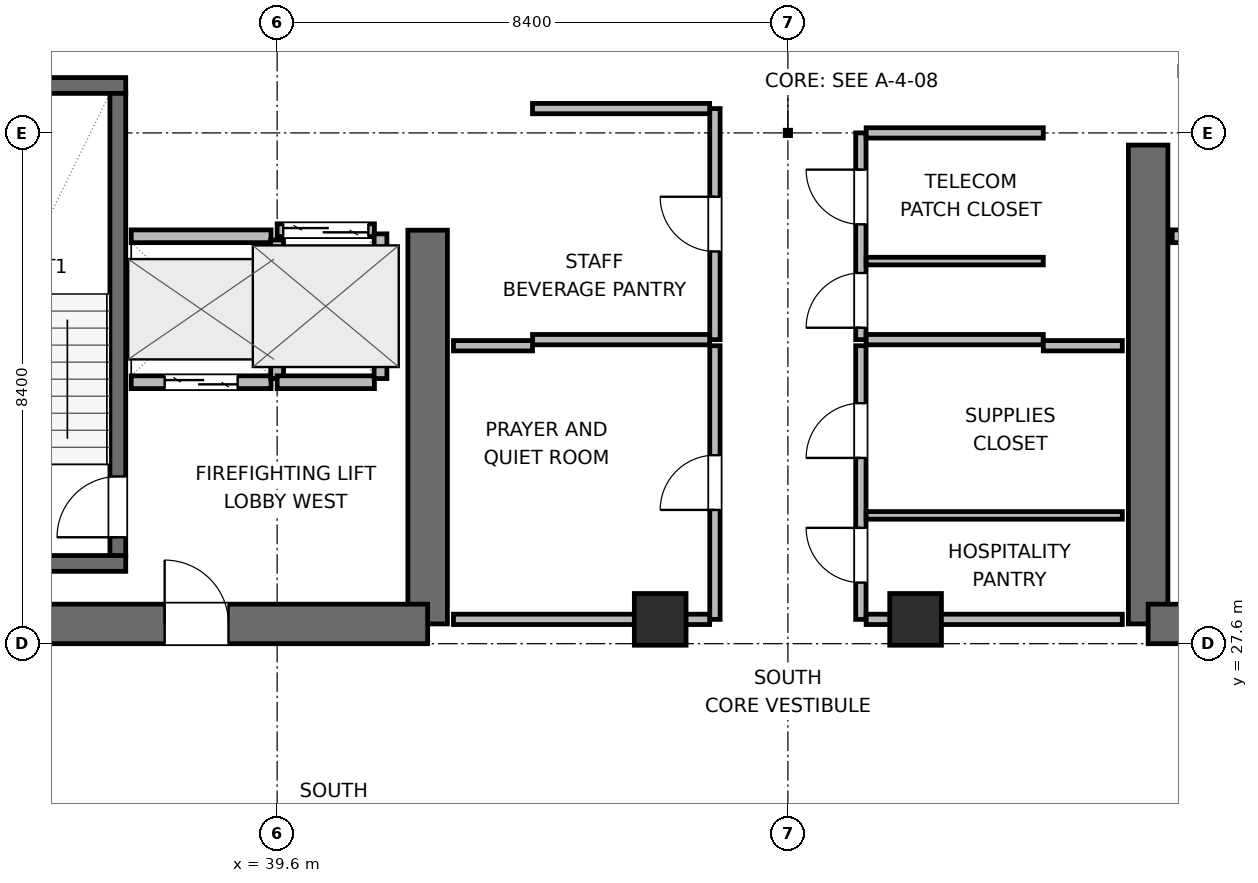
"""IFC4 building model, lengths in metres.
Left out: names, types, materials, properties, quantities, classifications, styles, units other than length and angle.
Written with IfcOpenShell. Run it as: python <this file> out.ifc"""

import sys

from ifc_helpers import new_model, si_unit, direction, frame, frame_2d, origin, origin_2d, place, context, subcontext, project, spatial, rectangle, extrude, element, fill, save


model = new_model("IFC4")
c1 = context("Model", 3, precision=1e-05, world=origin(), true_north=direction((0.0, 1.0)))
c2 = subcontext(c1, "Body", "Model", "MODEL_VIEW")
j1 = project(units=[si_unit("LENGTHUNIT", "METRE"), si_unit("PLANEANGLEUNIT", "RADIAN")], contexts=[c1])
p1 = place(None, origin())
s1 = spatial("IfcSite", under=j1, at=p1, CompositionType="ELEMENT")
p2 = place(p1, origin())
s2 = spatial("IfcBuilding", under=s1, at=p2, CompositionType="ELEMENT")
p3 = place(p2, frame((0.0, 0.0, 205.8)))
s3 = spatial("IfcBuildingStorey", under=s2, at=p3, CompositionType="ELEMENT", Elevation=205.8)
p4 = place(p3, frame((42.075, 27.925, 0.0), z_axis=(0.0, 0.0, 1.0), x_axis=(0.0, 1.0, 0.0)))
e1 = element("IfcWall", 1, at=p4, inside=s3, PredefinedType="SHEAR", context=c2, shape_type="SweptSolid", body=[
    extrude(rectangle(XDim=6.475, YDim=0.65, at=frame_2d((3.237, 0.0))), origin(), (0.0, 0.0, 1.0), 3.9),
])
p5 = place(p3, frame((32.725, 27.925, 0.0), z_axis=(0.0, 0.0, 1.0), x_axis=(1.0, 0.0, 0.0)))
e2 = element("IfcWall", 2, at=p5, inside=s3, PredefinedType="SHEAR", context=c2, shape_type="SweptSolid", body=[
    extrude(rectangle(XDim=9.35, YDim=0.65, at=frame_2d((4.675, 0.0))), origin(), (0.0, 0.0, 1.0), 3.9),
])
p6 = place(p5, frame((5.025, 0.0, 0.0)))
e3 = element("IfcOpeningElement", 3, at=p6, cuts=e2, PredefinedType="OPENING", context=c2, shape_type="SweptSolid", body=[
    extrude(rectangle(XDim=1.05, YDim=2.04, at=frame_2d((0.525, 1.02))), frame((0.0, 0.335, 0.0), z_axis=(0.0, -1.0, 0.0), x_axis=(1.0, 0.0, 0.0)), (0.0, 0.0, 1.0), 0.67),
])
p7 = place(p3, frame((53.925, 27.925, 0.0), z_axis=(0.0, 0.0, 1.0), x_axis=(0.0, 1.0, 0.0)))
e4 = element("IfcWall", 4, at=p7, inside=s3, PredefinedType="SHEAR", context=c2, shape_type="SweptSolid", body=[
    extrude(rectangle(XDim=7.875, YDim=0.65, at=frame_2d((3.938, 0.0))), origin(), (0.0, 0.0, 1.0), 3.9),
])
p8 = place(p3, frame((53.925, 27.925, 0.0), z_axis=(0.0, 0.0, 1.0), x_axis=(1.0, 0.0, 0.0)))
e5 = element("IfcWall", 5, at=p8, inside=s3, PredefinedType="SHEAR", context=c2, shape_type="SweptSolid", body=[
    extrude(rectangle(XDim=9.35, YDim=0.65, at=frame_2d((4.675, 0.0))), origin(), (0.0, 0.0, 1.0), 3.9),
])
p9 = place(p8, frame((3.975, 0.0, 0.0)))
e6 = element("IfcOpeningElement", 6, at=p9, cuts=e5, PredefinedType="OPENING", context=c2, shape_type="SweptSolid", body=[
    extrude(rectangle(XDim=1.05, YDim=2.04, at=frame_2d((0.525, 1.02))), frame((0.0, 0.335, 0.0), z_axis=(0.0, -1.0, 0.0), x_axis=(1.0, 0.0, 0.0)), (0.0, 0.0, 1.0), 0.67),
])
for number, where, z_axis, x_axis in (
    (7, (33.05, 28.92, 0.0), (0.0, 0.0, 1.0), (1.0, 0.0, 0.0)),
    (8, (33.05, 36.78, 0.0), (0.0, 0.0, 1.0), (1.0, 0.0, 0.0)),
):
    element("IfcWall", number, at=place(p3, frame(where, z_axis=z_axis, x_axis=x_axis)), inside=s3, PredefinedType="SHEAR", context=c2, shape_type="SweptSolid", body=[
        extrude(rectangle(XDim=4.06, YDim=0.26, at=frame_2d((2.03, 0.0))), origin(), (0.0, 0.0, 1.0), 3.9),
    ])
p10 = place(p3, frame((36.98, 29.05, 0.0), z_axis=(0.0, 0.0, 1.0), x_axis=(0.0, 1.0, 0.0)))
e9 = element("IfcWall", 9, at=p10, inside=s3, PredefinedType="SHEAR", context=c2, shape_type="SweptSolid", body=[
    extrude(rectangle(XDim=7.6, YDim=0.26, at=frame_2d((3.8, 0.0))), origin(), (0.0, 0.0, 1.0), 3.9),
])
p11 = place(p10, frame((0.3, 0.0, 0.0)))
e10 = element("IfcOpeningElement", 10, at=p11, cuts=e9, PredefinedType="OPENING", context=c2, shape_type="SweptSolid", body=[
    extrude(rectangle(XDim=1.0, YDim=2.04, at=frame_2d((0.5, 1.02))), frame((0.0, 0.14, 0.0), z_axis=(0.0, -1.0, 0.0), x_axis=(1.0, 0.0, 0.0)), (0.0, 0.0, 1.0), 0.28),
])
for number, where, z_axis, x_axis in (
    (11, (45.9, 28.0, 0.0), (0.0, 0.0, 1.0), (1.0, 0.0, 0.0)),
    (12, (50.1, 28.0, 0.0), (0.0, 0.0, 1.0), (1.0, 0.0, 0.0)),
):
    element("IfcColumn", number, at=place(p3, frame(where, z_axis=z_axis, x_axis=x_axis)), inside=s3, PredefinedType="COLUMN", context=c2, shape_type="SweptSolid", body=[
        extrude(rectangle(XDim=0.85, YDim=0.85, at=origin_2d()), origin(), (0.0, 0.0, 1.0), 3.9),
    ])
p12 = place(p3, frame((37.2, 31.9, 0.0), z_axis=(0.0, 0.0, 1.0), x_axis=(1.0, 0.0, 0.0)))
e13 = element("IfcWall", 13, at=p12, inside=s3, PredefinedType="PARTITIONING", context=c2, shape_type="SweptSolid", body=[
    extrude(rectangle(XDim=2.3, YDim=0.21, at=frame_2d((1.15, 0.0))), origin(), (0.0, 0.0, 1.0), 3.6),
])
p13 = place(p12, frame((0.55, 0.0, 0.0)))
e14 = element("IfcOpeningElement", 14, at=p13, cuts=e13, PredefinedType="OPENING", context=c2, shape_type="SweptSolid", body=[
    extrude(rectangle(XDim=1.2, YDim=2.04, at=frame_2d((0.6, 1.02))), frame((0.0, 0.115, 0.0), z_axis=(0.0, -1.0, 0.0), x_axis=(1.0, 0.0, 0.0)), (0.0, 0.0, 1.0), 0.23),
])
p14 = place(p3, frame((37.2, 34.3, 0.0), z_axis=(0.0, 0.0, 1.0), x_axis=(1.0, 0.0, 0.0)))
e15 = element("IfcWall", 15, at=p14, inside=s3, PredefinedType="PARTITIONING", context=c2, shape_type="SweptSolid", body=[
    extrude(rectangle(XDim=2.3, YDim=0.21, at=frame_2d((1.15, 0.0))), origin(), (0.0, 0.0, 1.0), 3.6),
])
p15 = place(p3, frame((39.6, 31.96, 0.0), z_axis=(0.0, 0.0, 1.0), x_axis=(0.0, 1.0, 0.0)))
e16 = element("IfcWall", 16, at=p15, inside=s3, PredefinedType="PARTITIONING", context=c2, shape_type="SweptSolid", body=[
    extrude(rectangle(XDim=2.28, YDim=0.21, at=frame_2d((1.14, 0.0))), origin(), (0.0, 0.0, 1.0), 3.6),
])
p16 = place(p3, frame((54.32, 34.3, 0.0), z_axis=(0.0, 0.0, 1.0), x_axis=(1.0, 0.0, 0.0)))
e17 = element("IfcWall", 17, at=p16, inside=s3, PredefinedType="PARTITIONING", context=c2, shape_type="SweptSolid", body=[
    extrude(rectangle(XDim=3.48, YDim=0.21, at=frame_2d((1.74, 0.0))), origin(), (0.0, 0.0, 1.0), 3.6),
])
p17 = place(p3, frame((39.6, 34.4, 0.0), z_axis=(0.0, 0.0, 1.0), x_axis=(1.0, 0.0, 0.0)))
e18 = element("IfcWall", 18, at=p17, inside=s3, PredefinedType="PARTITIONING", context=c2, shape_type="SweptSolid", body=[
    extrude(rectangle(XDim=1.6, YDim=0.21, at=frame_2d((0.8, 0.0))), origin(), (0.0, 0.0, 1.0), 3.6),
])
p18 = place(p17, frame((0.1, 0.0, 0.0)))
e19 = element("IfcOpeningElement", 19, at=p18, cuts=e18, PredefinedType="OPENING", context=c2, shape_type="SweptSolid", body=[
    extrude(rectangle(XDim=1.4, YDim=2.06, at=frame_2d((0.7, 1.03))), frame((0.0, 0.115, 0.0), z_axis=(0.0, -1.0, 0.0), x_axis=(1.0, 0.0, 0.0)), (0.0, 0.0, 1.0), 0.23),
])
p19 = place(p3, frame((39.6, 31.9, 0.0), z_axis=(0.0, 0.0, 1.0), x_axis=(1.0, 0.0, 0.0)))
e20 = element("IfcWall", 20, at=p19, inside=s3, PredefinedType="PARTITIONING", context=c2, shape_type="SweptSolid", body=[
    extrude(rectangle(XDim=1.6, YDim=0.21, at=frame_2d((0.8, 0.0))), origin(), (0.0, 0.0, 1.0), 3.6),
])
p20 = place(p3, frame((41.3, 31.96, 0.0), z_axis=(0.0, 0.0, 1.0), x_axis=(0.0, 1.0, 0.0)))
e21 = element("IfcWall", 21, at=p20, inside=s3, PredefinedType="PARTITIONING", context=c2, shape_type="SweptSolid", body=[
    extrude(rectangle(XDim=2.38, YDim=0.21, at=frame_2d((1.19, 0.0))), origin(), (0.0, 0.0, 1.0), 3.6),
])
p21 = place(p3, frame((46.8, 32.6, 0.0), z_axis=(0.0, 0.0, 1.0), x_axis=(0.0, 1.0, 0.0)))
e22 = element("IfcWall", 22, at=p21, inside=s3, PredefinedType="PARTITIONING", context=c2, shape_type="SweptSolid", body=[
    extrude(rectangle(XDim=3.8, YDim=0.17, at=frame_2d((1.9, 0.0))), origin(), (0.0, 0.0, 1.0), 3.6),
])
p22 = place(p21, frame((1.45, 0.0, 0.0)))
e23 = element("IfcOpeningElement", 23, at=p22, cuts=e22, PredefinedType="OPENING", context=c2, shape_type="SweptSolid", body=[
    extrude(rectangle(XDim=0.9, YDim=2.02, at=frame_2d((0.45, 1.01))), frame((0.0, 0.095, 0.0), z_axis=(0.0, -1.0, 0.0), x_axis=(1.0, 0.0, 0.0)), (0.0, 0.0, 1.0), 0.19),
])
for number, where, z_axis, x_axis in (
    (24, (43.8, 32.6, 0.0), (0.0, 0.0, 1.0), (1.0, 0.0, 0.0)),
    (25, (43.8, 36.4, 0.0), (0.0, 0.0, 1.0), (1.0, 0.0, 0.0)),
):
    element("IfcWall", number, at=place(p3, frame(where, z_axis=z_axis, x_axis=x_axis)), inside=s3, PredefinedType="PARTITIONING", context=c2, shape_type="SweptSolid", body=[
        extrude(rectangle(XDim=2.913, YDim=0.17, at=frame_2d((1.457, 0.0))), origin(), (0.0, 0.0, 1.0), 3.6),
    ])
p23 = place(p3, frame((49.2, 32.6, 0.0), z_axis=(0.0, 0.0, 1.0), x_axis=(0.0, 1.0, 0.0)))
e26 = element("IfcWall", 26, at=p23, inside=s3, PredefinedType="PARTITIONING", context=c2, shape_type="SweptSolid", body=[
    extrude(rectangle(XDim=3.4, YDim=0.17, at=frame_2d((1.7, 0.0))), origin(), (0.0, 0.0, 1.0), 3.6),
])
p24 = place(p23, frame((0.196, 0.0, 0.0)))
e27 = element("IfcOpeningElement", 27, at=p24, cuts=e26, PredefinedType="OPENING", context=c2, shape_type="SweptSolid", body=[
    extrude(rectangle(XDim=0.9, YDim=2.02, at=frame_2d((0.45, 1.01))), frame((0.0, 0.095, 0.0), z_axis=(0.0, -1.0, 0.0), x_axis=(1.0, 0.0, 0.0)), (0.0, 0.0, 1.0), 0.19),
])
p25 = place(p23, frame((1.896, 0.0, 0.0)))
e28 = element("IfcOpeningElement", 28, at=p25, cuts=e26, PredefinedType="OPENING", context=c2, shape_type="SweptSolid", body=[
    extrude(rectangle(XDim=0.9, YDim=2.02, at=frame_2d((0.45, 1.01))), frame((0.0, 0.095, 0.0), z_axis=(0.0, -1.0, 0.0), x_axis=(1.0, 0.0, 0.0)), (0.0, 0.0, 1.0), 0.19),
])
for number, where, z_axis, x_axis in (
    (29, (49.287, 32.6, 0.0), (0.0, 0.0, 1.0), (1.0, 0.0, 0.0)),
    (30, (49.287, 36.0, 0.0), (0.0, 0.0, 1.0), (1.0, 0.0, 0.0)),
):
    element("IfcWall", number, at=place(p3, frame(where, z_axis=z_axis, x_axis=x_axis)), inside=s3, PredefinedType="PARTITIONING", context=c2, shape_type="SweptSolid", body=[
        extrude(rectangle(XDim=2.913, YDim=0.17, at=frame_2d((1.457, 0.0))), origin(), (0.0, 0.0, 1.0), 3.6),
    ])
p26 = place(p3, frame((49.287, 33.892, 0.0), z_axis=(0.0, 0.0, 1.0), x_axis=(1.0, 0.0, 0.0)))
e31 = element("IfcWall", 31, at=p26, inside=s3, PredefinedType="PARTITIONING", context=c2, shape_type="SweptSolid", body=[
    extrude(rectangle(XDim=2.913, YDim=0.125, at=frame_2d((1.457, 0.0))), origin(), (0.0, 0.0, 1.0), 3.6),
])
p27 = place(p3, frame((46.8, 28.0, 0.0), z_axis=(0.0, 0.0, 1.0), x_axis=(0.0, 1.0, 0.0)))
e32 = element("IfcWall", 32, at=p27, inside=s3, PredefinedType="PARTITIONING", context=c2, shape_type="SweptSolid", body=[
    extrude(rectangle(XDim=4.5, YDim=0.17, at=frame_2d((2.25, 0.0))), origin(), (0.0, 0.0, 1.0), 3.6),
])
p28 = place(p27, frame((1.8, 0.0, 0.0)))
e33 = element("IfcOpeningElement", 33, at=p28, cuts=e32, PredefinedType="OPENING", context=c2, shape_type="SweptSolid", body=[
    extrude(rectangle(XDim=0.9, YDim=2.02, at=frame_2d((0.45, 1.01))), frame((0.0, 0.095, 0.0), z_axis=(0.0, -1.0, 0.0), x_axis=(1.0, 0.0, 0.0)), (0.0, 0.0, 1.0), 0.19),
])
p29 = place(p3, frame((42.5, 28.0, 0.0), z_axis=(0.0, 0.0, 1.0), x_axis=(1.0, 0.0, 0.0)))
e34 = element("IfcWall", 34, at=p29, inside=s3, PredefinedType="PARTITIONING", context=c2, shape_type="SweptSolid", body=[
    extrude(rectangle(XDim=4.213, YDim=0.17, at=frame_2d((2.106, 0.0))), origin(), (0.0, 0.0, 1.0), 2.685),
])
p30 = place(p3, frame((42.5, 32.5, 0.0), z_axis=(0.0, 0.0, 1.0), x_axis=(1.0, 0.0, 0.0)))
e35 = element("IfcWall", 35, at=p30, inside=s3, PredefinedType="PARTITIONING", context=c2, shape_type="SweptSolid", body=[
    extrude(rectangle(XDim=1.3, YDim=0.17, at=frame_2d((0.65, 0.0))), origin(), (0.0, 0.0, 1.0), 3.6),
])
p31 = place(p3, frame((49.2, 28.0, 0.0), z_axis=(0.0, 0.0, 1.0), x_axis=(0.0, 1.0, 0.0)))
e36 = element("IfcWall", 36, at=p31, inside=s3, PredefinedType="PARTITIONING", context=c2, shape_type="SweptSolid", body=[
    extrude(rectangle(XDim=4.5, YDim=0.17, at=frame_2d((2.25, 0.0))), origin(), (0.0, 0.0, 1.0), 3.6),
])
p32 = place(p31, frame((0.605, 0.0, 0.0)))
e37 = element("IfcOpeningElement", 37, at=p32, cuts=e36, PredefinedType="OPENING", context=c2, shape_type="SweptSolid", body=[
    extrude(rectangle(XDim=0.9, YDim=2.02, at=frame_2d((0.45, 1.01))), frame((0.0, 0.095, 0.0), z_axis=(0.0, -1.0, 0.0), x_axis=(1.0, 0.0, 0.0)), (0.0, 0.0, 1.0), 0.19),
])
p33 = place(p31, frame((2.655, 0.0, 0.0)))
e38 = element("IfcOpeningElement", 38, at=p33, cuts=e36, PredefinedType="OPENING", context=c2, shape_type="SweptSolid", body=[
    extrude(rectangle(XDim=0.9, YDim=2.02, at=frame_2d((0.45, 1.01))), frame((0.0, 0.095, 0.0), z_axis=(0.0, -1.0, 0.0), x_axis=(1.0, 0.0, 0.0)), (0.0, 0.0, 1.0), 0.19),
])
p34 = place(p3, frame((49.287, 28.0, 0.0), z_axis=(0.0, 0.0, 1.0), x_axis=(1.0, 0.0, 0.0)))
e39 = element("IfcWall", 39, at=p34, inside=s3, PredefinedType="PARTITIONING", context=c2, shape_type="SweptSolid", body=[
    extrude(rectangle(XDim=4.213, YDim=0.17, at=frame_2d((2.106, 0.0))), origin(), (0.0, 0.0, 1.0), 2.685),
])
p35 = place(p3, frame((52.2, 32.5, 0.0), z_axis=(0.0, 0.0, 1.0), x_axis=(1.0, 0.0, 0.0)))
e40 = element("IfcWall", 40, at=p35, inside=s3, PredefinedType="PARTITIONING", context=c2, shape_type="SweptSolid", body=[
    extrude(rectangle(XDim=1.3, YDim=0.17, at=frame_2d((0.65, 0.0))), origin(), (0.0, 0.0, 1.0), 3.6),
])
p36 = place(p3, frame((49.287, 29.71, 0.0), z_axis=(0.0, 0.0, 1.0), x_axis=(1.0, 0.0, 0.0)))
e41 = element("IfcWall", 41, at=p36, inside=s3, PredefinedType="PARTITIONING", context=c2, shape_type="SweptSolid", body=[
    extrude(rectangle(XDim=4.213, YDim=0.125, at=frame_2d((2.106, 0.0))), origin(), (0.0, 0.0, 1.0), 3.6),
])
p37 = place(p11, origin())
e42 = element("IfcDoor", 42, at=p37, inside=s3, OperationType="SINGLE_SWING_LEFT", PredefinedType="DOOR", context=c2, shape_type="SweptSolid", body=[
    extrude(rectangle(XDim=1.0, YDim=2.04, at=frame_2d((0.5, 1.02))), frame((0.0, 0.025, 0.0), z_axis=(0.0, -1.0, 0.0), x_axis=(1.0, 0.0, 0.0)), (0.0, 0.0, 1.0), 0.05),
])
fill(e10, e42)
p38 = place(p13, origin())
e43 = element("IfcDoor", 43, at=p38, inside=s3, OperationType="DOUBLE_DOOR_SLIDING", PredefinedType="DOOR", context=c2, shape_type="SweptSolid", body=[
    extrude(rectangle(XDim=1.2, YDim=2.04, at=frame_2d((0.6, 1.02))), frame((0.0, 0.025, 0.0), z_axis=(0.0, -1.0, 0.0), x_axis=(1.0, 0.0, 0.0)), (0.0, 0.0, 1.0), 0.05),
])
fill(e14, e43)
p39 = place(p18, origin())
e44 = element("IfcDoor", 44, at=p39, inside=s3, OperationType="DOUBLE_DOOR_SLIDING", PredefinedType="DOOR", context=c2, shape_type="SweptSolid", body=[
    extrude(rectangle(XDim=1.4, YDim=2.06, at=frame_2d((0.7, 1.03))), frame((0.0, 0.025, 0.0), z_axis=(0.0, -1.0, 0.0), x_axis=(1.0, 0.0, 0.0)), (0.0, 0.0, 1.0), 0.05),
])
fill(e19, e44)
p40 = place(p6, origin())
e45 = element("IfcDoor", 45, at=p40, inside=s3, OperationType="SINGLE_SWING_LEFT", PredefinedType="DOOR", context=c2, shape_type="SweptSolid", body=[
    extrude(rectangle(XDim=1.05, YDim=2.04, at=frame_2d((0.525, 1.02))), frame((0.0, 0.025, 0.0), z_axis=(0.0, -1.0, 0.0), x_axis=(1.0, 0.0, 0.0)), (0.0, 0.0, 1.0), 0.05),
])
fill(e3, e45)
p41 = place(p22, origin())
e46 = element("IfcDoor", 46, at=p41, inside=s3, OperationType="SINGLE_SWING_RIGHT", PredefinedType="DOOR", context=c2, shape_type="SweptSolid", body=[
    extrude(rectangle(XDim=0.9, YDim=2.02, at=frame_2d((0.45, 1.01))), frame((0.0, 0.025, 0.0), z_axis=(0.0, -1.0, 0.0), x_axis=(1.0, 0.0, 0.0)), (0.0, 0.0, 1.0), 0.05),
])
fill(e23, e46)
p42 = place(p24, origin())
e47 = element("IfcDoor", 47, at=p42, inside=s3, OperationType="SINGLE_SWING_LEFT", PredefinedType="DOOR", context=c2, shape_type="SweptSolid", body=[
    extrude(rectangle(XDim=0.9, YDim=2.02, at=frame_2d((0.45, 1.01))), frame((0.0, 0.025, 0.0), z_axis=(0.0, -1.0, 0.0), x_axis=(1.0, 0.0, 0.0)), (0.0, 0.0, 1.0), 0.05),
])
fill(e27, e47)
p43 = place(p25, origin())
e48 = element("IfcDoor", 48, at=p43, inside=s3, OperationType="SINGLE_SWING_RIGHT", PredefinedType="DOOR", context=c2, shape_type="SweptSolid", body=[
    extrude(rectangle(XDim=0.9, YDim=2.02, at=frame_2d((0.45, 1.01))), frame((0.0, 0.025, 0.0), z_axis=(0.0, -1.0, 0.0), x_axis=(1.0, 0.0, 0.0)), (0.0, 0.0, 1.0), 0.05),
])
fill(e28, e48)
p44 = place(p28, origin())
e49 = element("IfcDoor", 49, at=p44, inside=s3, OperationType="SINGLE_SWING_LEFT", PredefinedType="DOOR", context=c2, shape_type="SweptSolid", body=[
    extrude(rectangle(XDim=0.9, YDim=2.02, at=frame_2d((0.45, 1.01))), frame((0.0, 0.025, 0.0), z_axis=(0.0, -1.0, 0.0), x_axis=(1.0, 0.0, 0.0)), (0.0, 0.0, 1.0), 0.05),
])
fill(e33, e49)
p45 = place(p32, origin())
e50 = element("IfcDoor", 50, at=p45, inside=s3, OperationType="SINGLE_SWING_RIGHT", PredefinedType="DOOR", context=c2, shape_type="SweptSolid", body=[
    extrude(rectangle(XDim=0.9, YDim=2.02, at=frame_2d((0.45, 1.01))), frame((0.0, 0.025, 0.0), z_axis=(0.0, -1.0, 0.0), x_axis=(1.0, 0.0, 0.0)), (0.0, 0.0, 1.0), 0.05),
])
fill(e37, e50)
p46 = place(p33, origin())
e51 = element("IfcDoor", 51, at=p46, inside=s3, OperationType="SINGLE_SWING_LEFT", PredefinedType="DOOR", context=c2, shape_type="SweptSolid", body=[
    extrude(rectangle(XDim=0.9, YDim=2.02, at=frame_2d((0.45, 1.01))), frame((0.0, 0.025, 0.0), z_axis=(0.0, -1.0, 0.0), x_axis=(1.0, 0.0, 0.0)), (0.0, 0.0, 1.0), 0.05),
])
fill(e38, e51)
save(model, sys.argv[1])
